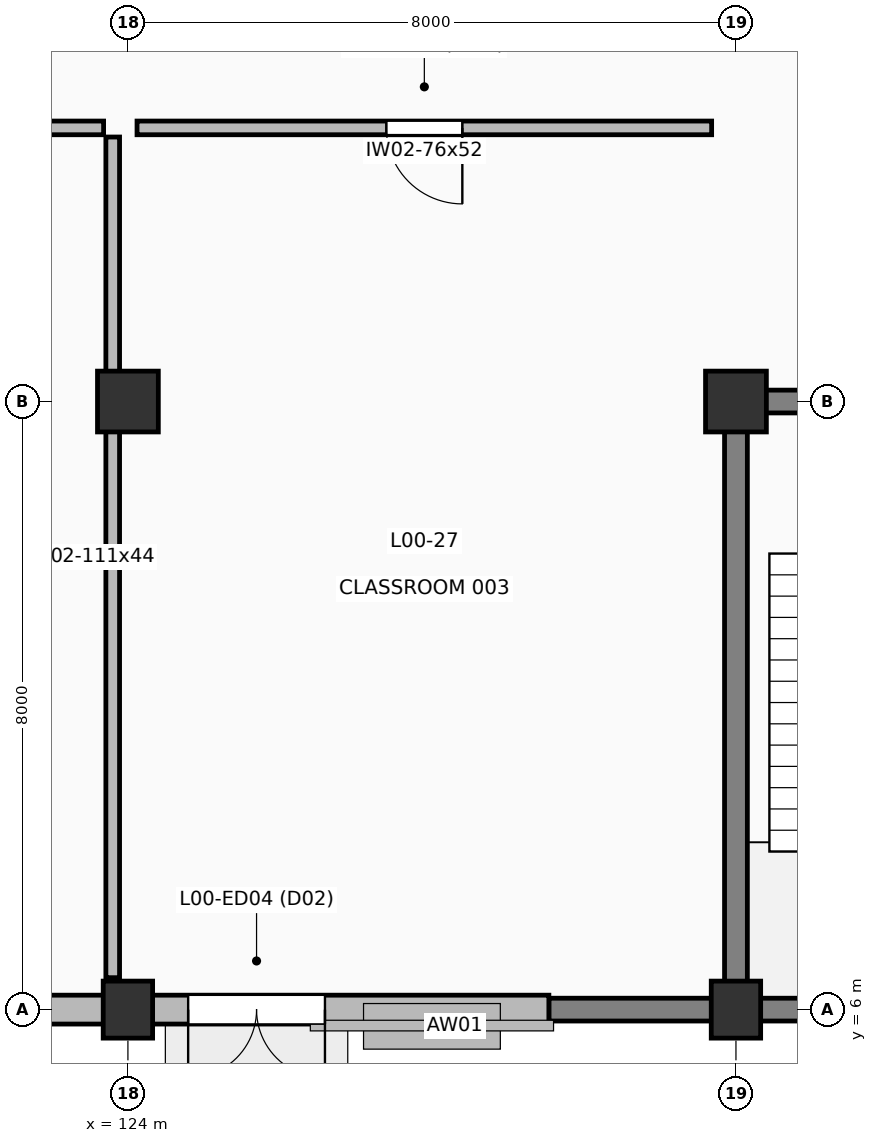
"""IFC4 building model, lengths in metres.
Left out: names, types, materials, properties, quantities, classifications, styles, units other than length and angle.
Written with IfcOpenShell. Run it as: python <this file> out.ifc"""

import sys

from ifc_helpers import new_model, si_unit, direction, frame, frame_2d, origin, origin_2d, place, context, subcontext, project, spatial, rectangle, extrude, element, fill, save


model = new_model("IFC4")
c1 = context("Model", 3, precision=1e-05, world=origin(), true_north=direction((0.0, 1.0)))
c2 = subcontext(c1, "Body", "Model", "MODEL_VIEW")
j1 = project(units=[si_unit("LENGTHUNIT", "METRE"), si_unit("PLANEANGLEUNIT", "RADIAN")], contexts=[c1])
p1 = place(None, origin())
s1 = spatial("IfcSite", under=j1, at=p1, CompositionType="ELEMENT")
p2 = place(p1, origin())
s2 = spatial("IfcBuilding", under=s1, at=p2, CompositionType="ELEMENT")
p3 = place(p2, origin())
s3 = spatial("IfcBuildingStorey", under=s2, at=p3, CompositionType="ELEMENT", Elevation=0.0)
p4 = place(p3, frame((124.0, 6.0, 0.0), z_axis=(0.0, 0.0, 1.0), x_axis=(1.0, 0.0, 0.0)))
e1 = element("IfcColumn", 1, at=p4, inside=s3, PredefinedType="PILASTER", context=c2, shape_type="SweptSolid", body=[
    extrude(rectangle(XDim=0.65, YDim=0.75, at=origin_2d()), origin(), (0.0, 0.0, 1.0), 5.4),
])
p5 = place(p3, frame((124.0, 14.0, 0.0), z_axis=(0.0, 0.0, 1.0), x_axis=(1.0, 0.0, 0.0)))
e2 = element("IfcColumn", 2, at=p5, inside=s3, PredefinedType="COLUMN", context=c2, shape_type="SweptSolid", body=[
    extrude(rectangle(XDim=0.8, YDim=0.8, at=origin_2d()), origin(), (0.0, 0.0, 1.0), 5.4),
])
p6 = place(p3, frame((132.0, 6.0, 0.0), z_axis=(0.0, 0.0, 1.0), x_axis=(1.0, 0.0, 0.0)))
e3 = element("IfcColumn", 3, at=p6, inside=s3, PredefinedType="PILASTER", context=c2, shape_type="SweptSolid", body=[
    extrude(rectangle(XDim=0.65, YDim=0.75, at=origin_2d()), origin(), (0.0, 0.0, 1.0), 5.4),
])
p7 = place(p3, frame((132.0, 14.0, 0.0), z_axis=(0.0, 0.0, 1.0), x_axis=(1.0, 0.0, 0.0)))
e4 = element("IfcColumn", 4, at=p7, inside=s3, PredefinedType="COLUMN", context=c2, shape_type="SweptSolid", body=[
    extrude(rectangle(XDim=0.8, YDim=0.8, at=origin_2d()), origin(), (0.0, 0.0, 1.0), 5.4),
])
p8 = place(p3, frame((137.231, 6.0, 0.0), z_axis=(0.0, 0.0, 1.0), x_axis=(-1.0, 0.0, 0.0)))
e5 = element("IfcWall", 5, at=p8, inside=s3, PredefinedType="SOLIDWALL", context=c2, shape_type="SweptSolid", body=[
    extrude(rectangle(XDim=7.692, YDim=0.3, at=frame_2d((3.846, 0.0))), origin(), (0.0, 0.0, 1.0), 5.4),
])
p9 = place(p8, frame((2.081, 0.0, 0.0)))
e6 = element("IfcOpeningElement", 6, at=p9, cuts=e5, PredefinedType="OPENING", context=c2, shape_type="SweptSolid", body=[
    extrude(rectangle(XDim=1.5, YDim=2.2, at=frame_2d((0.75, 1.1))), frame((0.0, 0.16, 0.0), z_axis=(0.0, -1.0, 0.0), x_axis=(1.0, 0.0, 0.0)), (0.0, 0.0, 1.0), 0.32),
])
p10 = place(p3, frame((129.539, 6.0, 0.0), z_axis=(0.0, 0.0, 1.0), x_axis=(-1.0, 0.0, 0.0)))
e7 = element("IfcWall", 7, at=p10, inside=s3, PredefinedType="SOLIDWALL", context=c2, shape_type="SweptSolid", body=[
    extrude(rectangle(XDim=7.692, YDim=0.38, at=frame_2d((3.846, 0.0))), origin(), (0.0, 0.0, 1.0), 4.495),
])
p11 = place(p10, frame((2.946, 0.0, 0.0)))
e8 = element("IfcOpeningElement", 8, at=p11, cuts=e7, PredefinedType="OPENING", context=c2, shape_type="SweptSolid", body=[
    extrude(rectangle(XDim=1.8, YDim=2.3, at=frame_2d((0.9, 1.15))), frame((0.0, 0.2, 0.0), z_axis=(0.0, -1.0, 0.0), x_axis=(1.0, 0.0, 0.0)), (0.0, 0.0, 1.0), 0.4),
])
p12 = place(p3, frame((132.0, 6.0, 0.0), z_axis=(0.0, 0.0, 1.0), x_axis=(0.0, 1.0, 0.0)))
e9 = element("IfcWall", 9, at=p12, inside=s3, PredefinedType="SHEAR", context=c2, shape_type="SweptSolid", body=[
    extrude(rectangle(XDim=8.0, YDim=0.3, at=frame_2d((4.0, 0.0))), origin(), (0.0, 0.0, 1.0), 5.4),
])
p13 = place(p3, frame((132.0, 14.0, 0.0), z_axis=(0.0, 0.0, 1.0), x_axis=(1.0, 0.0, 0.0)))
e10 = element("IfcWall", 10, at=p13, inside=s3, PredefinedType="SHEAR", context=c2, shape_type="SweptSolid", body=[
    extrude(rectangle(XDim=8.0, YDim=0.3, at=frame_2d((4.0, 0.0))), origin(), (0.0, 0.0, 1.0), 5.4),
])
p14 = place(p13, frame((1.45, 0.0, 0.0)))
e11 = element("IfcOpeningElement", 11, at=p14, cuts=e10, PredefinedType="OPENING", context=c2, shape_type="SweptSolid", body=[
    extrude(rectangle(XDim=1.5, YDim=2.2, at=frame_2d((0.75, 1.1))), frame((0.0, 0.16, 0.0), z_axis=(0.0, -1.0, 0.0), x_axis=(1.0, 0.0, 0.0)), (0.0, 0.0, 1.0), 0.32),
])
p15 = place(p3, frame((123.68, 17.6, 0.0), z_axis=(0.0, 0.0, 1.0), x_axis=(-1.0, 0.0, 0.0)))
e12 = element("IfcWall", 12, at=p15, inside=s3, PredefinedType="PARTITIONING", context=c2, shape_type="SweptSolid", body=[
    extrude(rectangle(XDim=15.36, YDim=0.18, at=frame_2d((7.68, 0.0))), origin(), (0.0, 0.0, 1.0), 5.16),
])
p16 = place(p15, frame((7.18, 0.0, 0.0)))
e13 = element("IfcOpeningElement", 13, at=p16, cuts=e12, PredefinedType="OPENING", context=c2, shape_type="SweptSolid", body=[
    extrude(rectangle(XDim=1.0, YDim=2.15, at=frame_2d((0.5, 1.075))), frame((0.0, 0.1, 0.0), z_axis=(0.0, -1.0, 0.0), x_axis=(1.0, 0.0, 0.0)), (0.0, 0.0, 1.0), 0.2),
])
p17 = place(p3, frame((123.8, 6.42, 0.0), z_axis=(0.0, 0.0, 1.0), x_axis=(0.0, 1.0, 0.0)))
e14 = element("IfcWall", 14, at=p17, inside=s3, PredefinedType="PARTITIONING", context=c2, shape_type="SweptSolid", body=[
    extrude(rectangle(XDim=11.06, YDim=0.18, at=frame_2d((5.53, 0.0))), origin(), (0.0, 0.0, 1.0), 4.445),
])
p18 = place(p3, frame((131.68, 17.6, 0.0), z_axis=(0.0, 0.0, 1.0), x_axis=(-1.0, 0.0, 0.0)))
e15 = element("IfcWall", 15, at=p18, inside=s3, PredefinedType="PARTITIONING", context=c2, shape_type="SweptSolid", body=[
    extrude(rectangle(XDim=7.56, YDim=0.18, at=frame_2d((3.78, 0.0))), origin(), (0.0, 0.0, 1.0), 5.16),
])
p19 = place(p18, frame((3.28, 0.0, 0.0)))
e16 = element("IfcOpeningElement", 16, at=p19, cuts=e15, PredefinedType="OPENING", context=c2, shape_type="SweptSolid", body=[
    extrude(rectangle(XDim=1.0, YDim=2.15, at=frame_2d((0.5, 1.075))), frame((0.0, 0.1, 0.0), z_axis=(0.0, -1.0, 0.0), x_axis=(1.0, 0.0, 0.0)), (0.0, 0.0, 1.0), 0.2),
])
p20 = place(p11, origin())
e17 = element("IfcDoor", 17, at=p20, inside=s3, OperationType="DOUBLE_DOOR_SINGLE_SWING", PredefinedType="DOOR", context=c2, shape_type="SweptSolid", body=[
    extrude(rectangle(XDim=1.8, YDim=2.3, at=frame_2d((0.9, 1.15))), frame((0.0, 0.025, 0.0), z_axis=(0.0, -1.0, 0.0), x_axis=(1.0, 0.0, 0.0)), (0.0, 0.0, 1.0), 0.05),
])
fill(e8, e17)
p21 = place(p19, origin())
e18 = element("IfcDoor", 18, at=p21, inside=s3, OperationType="SINGLE_SWING_LEFT", PredefinedType="DOOR", context=c2, shape_type="SweptSolid", body=[
    extrude(rectangle(XDim=1.0, YDim=2.15, at=frame_2d((0.5, 1.075))), frame((0.0, 0.025, 0.0), z_axis=(0.0, -1.0, 0.0), x_axis=(1.0, 0.0, 0.0)), (0.0, 0.0, 1.0), 0.05),
])
fill(e16, e18)
save(model, sys.argv[1])
